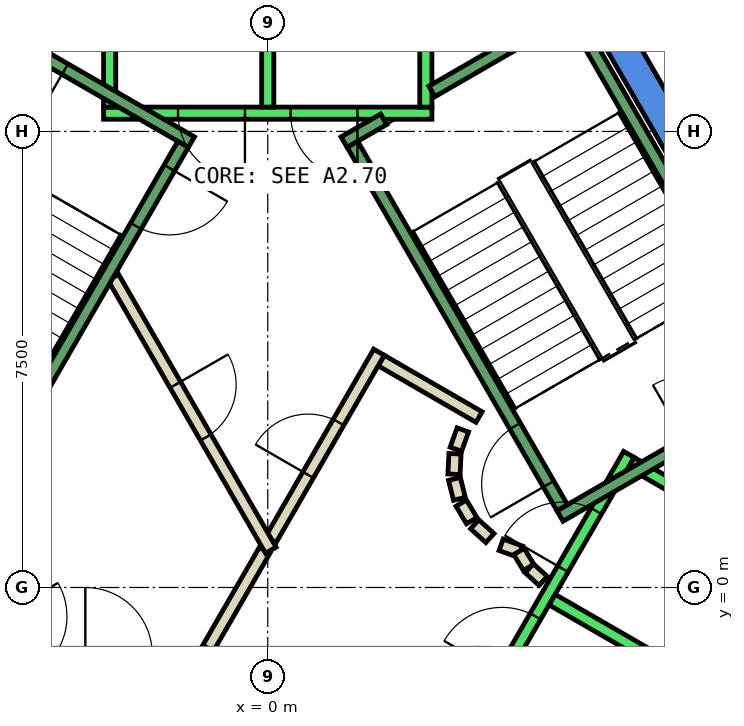
"""IFC4 building model, lengths in metres.
Left out: names, types, materials, properties, quantities, classifications, styles, units other than length and angle.
Written with IfcOpenShell. Run it as: python <this file> out.ifc"""

import sys

from ifc_helpers import new_model, si_unit, direction, frame, frame_2d, origin, place, context, subcontext, project, spatial, polyline, rectangle, outline, extrude, element, fill, save


model = new_model("IFC4")
c1 = context("Model", 3, precision=1e-05, world=origin(), true_north=direction((0.0, 1.0)))
c2 = subcontext(c1, "Body", "Model", "MODEL_VIEW")
j1 = project(units=[si_unit("LENGTHUNIT", "METRE"), si_unit("PLANEANGLEUNIT", "RADIAN")], contexts=[c1])
p1 = place(None, origin())
s1 = spatial("IfcSite", under=j1, at=p1, CompositionType="ELEMENT")
p2 = place(p1, origin())
s2 = spatial("IfcBuilding", under=s1, at=p2, CompositionType="ELEMENT")
p3 = place(p2, frame((0.0, 0.0, 331.4)))
s3 = spatial("IfcBuildingStorey", under=s2, at=p3, CompositionType="ELEMENT", Elevation=331.4)
p4 = place(p3, frame((0.0, 0.0, -0.45)))
e1 = element("IfcWall", 1, at=p4, inside=s3, PredefinedType="SHEAR", context=c2, shape_type="SweptSolid", body=[
    extrude(outline(polyline([(5.486, 9.998), (5.053, 9.748), (9.238, 2.5), (9.815, 2.5), (5.486, 9.998)])), origin(), (0.0, 0.0, 1.0), 4.6),
])
p5 = place(p3, frame((0.0, 0.0, -0.45)))
e2 = element("IfcWall", 2, at=p5, inside=s3, PredefinedType="SHEAR", context=c2, shape_type="SweptSolid", body=[
    extrude(outline(polyline([(4.907, -6.0), (9.815, 2.5), (9.238, 2.5), (4.619, -5.5), (4.907, -6.0)])), origin(), (0.0, 0.0, 1.0), 4.6),
])
p6 = place(p3, frame((-0.982, -1.0, 0.0), z_axis=(0.0, 0.0, 1.0), x_axis=(0.50024047865, 0.865886518847, 0.0)))
e3 = element("IfcWall", 3, at=p6, inside=s3, PredefinedType="PARTITIONING", context=c2, shape_type="SweptSolid", body=[
    extrude(rectangle(XDim=1.863, YDim=0.2, at=frame_2d((0.931, 0.0))), origin(), (0.0, 0.0, 1.0), 4.15),
])
p7 = place(p3, frame((1.866, 3.732, 0.0), z_axis=(0.0, 0.0, 1.0), x_axis=(0.866043361281, -0.499968895414, 0.0)))
e4 = element("IfcWall", 4, at=p7, inside=s3, PredefinedType="PARTITIONING", context=c2, shape_type="SweptSolid", body=[
    extrude(rectangle(XDim=1.858, YDim=0.2, at=frame_2d((0.929, 0.0))), origin(), (0.0, 0.0, 1.0), 4.15),
])
p8 = place(p3, frame((3.208, 2.592, 0.0), z_axis=(0.0, 0.0, 1.0), x_axis=(-0.337388820924, -0.941365382578, 0.0)))
e5 = element("IfcWall", 5, at=p8, inside=s3, PredefinedType="PARTITIONING", context=c2, shape_type="SweptSolid", body=[
    extrude(rectangle(XDim=0.338, YDim=0.2, at=frame_2d((0.169, 0.0))), origin(), (0.0, 0.0, 1.0), 4.15),
])
p9 = place(p3, frame((3.079, 2.199, 0.0), z_axis=(0.0, 0.0, 1.0), x_axis=(-0.047771483479, -0.998858290933, 0.0)))
e6 = element("IfcWall", 6, at=p9, inside=s3, PredefinedType="PARTITIONING", context=c2, shape_type="SweptSolid", body=[
    extrude(rectangle(XDim=0.337, YDim=0.2, at=frame_2d((0.169, 0.0))), origin(), (0.0, 0.0, 1.0), 4.15),
])
p10 = place(p3, frame((3.07, 1.786, 0.0), z_axis=(0.0, 0.0, 1.0), x_axis=(0.242705583207, -0.970099994784, 0.0)))
e7 = element("IfcWall", 7, at=p10, inside=s3, PredefinedType="PARTITIONING", context=c2, shape_type="SweptSolid", body=[
    extrude(rectangle(XDim=0.338, YDim=0.2, at=frame_2d((0.169, 0.0))), origin(), (0.0, 0.0, 1.0), 4.15),
])
for number, where, z_axis, x_axis in (
    (8, (3.182, 1.388, 0.0), (0.0, 0.0, 1.0), (0.512, -0.859, 0.0)),
    (9, (3.404, 1.039, 0.0), (0.0, 0.0, 1.0), (0.74, -0.672, 0.0)),
):
    element("IfcWall", number, at=place(p3, frame(where, z_axis=z_axis, x_axis=x_axis)), inside=s3, PredefinedType="PARTITIONING", context=c2, shape_type="SweptSolid", body=[
        extrude(rectangle(XDim=0.338, YDim=0.2, at=frame_2d((0.169, 0.0))), origin(), (0.0, 0.0, 1.0), 4.15),
    ])
p11 = place(p3, frame((3.838, 0.702, 0.0), z_axis=(0.0, 0.0, 1.0), x_axis=(0.941035081519, -0.338308993895, 0.0)))
e10 = element("IfcWall", 10, at=p11, inside=s3, PredefinedType="PARTITIONING", context=c2, shape_type="SweptSolid", body=[
    extrude(rectangle(XDim=0.337, YDim=0.2, at=frame_2d((0.168, 0.0))), origin(), (0.0, 0.0, 1.0), 4.15),
])
p12 = place(p3, frame((4.132, 0.593, 0.0), z_axis=(0.0, 0.0, 1.0), x_axis=(0.513561617048, -0.858052717201, 0.0)))
e11 = element("IfcWall", 11, at=p12, inside=s3, PredefinedType="PARTITIONING", context=c2, shape_type="SweptSolid", body=[
    extrude(rectangle(XDim=0.308, YDim=0.2, at=frame_2d((0.154, 0.0))), origin(), (0.0, 0.0, 1.0), 4.15),
])
p13 = place(p3, frame((4.301, 0.315, 0.0), z_axis=(0.0, 0.0, 1.0), x_axis=(0.741798017506, -0.670623367639, 0.0)))
e12 = element("IfcWall", 12, at=p13, inside=s3, PredefinedType="PARTITIONING", context=c2, shape_type="SweptSolid", body=[
    extrude(rectangle(XDim=0.309, YDim=0.2, at=frame_2d((0.154, 0.0))), origin(), (0.0, 0.0, 1.0), 4.15),
])
p14 = place(p3, frame((0.05, 0.787, 0.0), z_axis=(0.0, 0.0, 1.0), x_axis=(0.499954076797, 0.866051915934, 0.0)))
e13 = element("IfcWall", 13, at=p14, inside=s3, PredefinedType="PARTITIONING", context=c2, shape_type="SweptSolid", body=[
    extrude(rectangle(XDim=3.558, YDim=0.2, at=frame_2d((1.779, 0.0))), origin(), (0.0, 0.0, 1.0), 4.15),
])
p15 = place(p14, frame((1.229, 0.0, 0.0)))
e14 = element("IfcOpeningElement", 14, at=p15, cuts=e13, PredefinedType="OPENING", context=c2, shape_type="SweptSolid", body=[
    extrude(rectangle(XDim=1.0, YDim=2.1, at=frame_2d((0.5, 1.05))), frame((0.0, 0.11, 0.0), z_axis=(0.0, -1.0, 0.0), x_axis=(1.0, 0.0, 0.0)), (0.0, 0.0, 1.0), 0.22),
])
p16 = place(p3, frame((-2.54, 5.1, 0.0), z_axis=(0.0, 0.0, 1.0), x_axis=(0.499925051871, -0.866068670783, 0.0)))
e15 = element("IfcWall", 15, at=p16, inside=s3, PredefinedType="PARTITIONING", context=c2, shape_type="SweptSolid", body=[
    extrude(rectangle(XDim=5.181, YDim=0.2, at=frame_2d((2.59, 0.0))), origin(), (0.0, 0.0, 1.0), 4.15),
])
p17 = place(p16, frame((2.04, 0.0, 0.0)))
e16 = element("IfcOpeningElement", 16, at=p17, cuts=e15, PredefinedType="OPENING", context=c2, shape_type="SweptSolid", body=[
    extrude(rectangle(XDim=1.0, YDim=2.1, at=frame_2d((0.5, 1.05))), frame((0.0, 0.11, 0.0), z_axis=(0.0, -1.0, 0.0), x_axis=(1.0, 0.0, 0.0)), (0.0, 0.0, 1.0), 0.22),
])
p18 = place(p3, frame((5.532, 14.717, 0.0), z_axis=(0.0, 0.0, 1.0), x_axis=(0.499968011863, -0.866043871356, 0.0)))
e17 = element("IfcWall", 17, at=p18, inside=s3, PredefinedType="PARTITIONING", context=c2, shape_type="SweptSolid", body=[
    extrude(rectangle(XDim=7.201, YDim=0.2, at=frame_2d((3.6, 0.0))), origin(), (0.0, 0.0, 1.0), 4.15),
])
p19 = place(p18, frame((2.68, 0.0, 0.0)))
e18 = element("IfcOpeningElement", 18, at=p19, cuts=e17, PredefinedType="OPENING", context=c2, shape_type="SweptSolid", body=[
    extrude(rectangle(XDim=1.0, YDim=2.1, at=frame_2d((0.5, 1.05))), frame((0.0, 0.11, 0.0), z_axis=(0.0, -1.0, 0.0), x_axis=(1.0, 0.0, 0.0)), (0.0, 0.0, 1.0), 0.22),
])
p20 = place(p3, frame((2.7, 7.8, 0.0), z_axis=(0.0, 0.0, 1.0), x_axis=(-1.0, 0.0, 0.0)))
e19 = element("IfcWall", 19, at=p20, inside=s3, PredefinedType="STANDARD", context=c2, shape_type="SweptSolid", body=[
    extrude(rectangle(XDim=5.4, YDim=0.2, at=frame_2d((2.7, 0.0))), origin(), (0.0, 0.0, 1.0), 4.15),
])
p21 = place(p20, frame((1.225, 0.0, 0.0)))
e20 = element("IfcOpeningElement", 20, at=p21, cuts=e19, PredefinedType="OPENING", context=c2, shape_type="SweptSolid", body=[
    extrude(rectangle(XDim=1.1, YDim=2.1, at=frame_2d((0.55, 1.05))), frame((0.0, 0.11, 0.0), z_axis=(0.0, -1.0, 0.0), x_axis=(1.0, 0.0, 0.0)), (0.0, 0.0, 1.0), 0.22),
])
p22 = place(p20, frame((3.075, 0.0, 0.0)))
e21 = element("IfcOpeningElement", 21, at=p22, cuts=e19, PredefinedType="OPENING", context=c2, shape_type="SweptSolid", body=[
    extrude(rectangle(XDim=1.1, YDim=2.1, at=frame_2d((0.55, 1.05))), frame((0.0, 0.11, 0.0), z_axis=(0.0, -1.0, 0.0), x_axis=(1.0, 0.0, 0.0)), (0.0, 0.0, 1.0), 0.22),
])
for number, where, z_axis, x_axis in (
    (22, (2.6, 7.9, 0.0), (0.0, 0.0, 1.0), (0.0, 1.0, 0.0)),
    (23, (0.0, 7.9, 0.0), (0.0, 0.0, 1.0), (0.0, 1.0, 0.0)),
    (24, (-2.6, 7.9, 0.0), (0.0, 0.0, 1.0), (0.0, 1.0, 0.0)),
):
    element("IfcWall", number, at=place(p3, frame(where, z_axis=z_axis, x_axis=x_axis)), inside=s3, PredefinedType="STANDARD", context=c2, shape_type="SweptSolid", body=[
        extrude(rectangle(XDim=2.4, YDim=0.2, at=frame_2d((1.2, 0.0))), origin(), (0.0, 0.0, 1.0), 4.15),
    ])
p23 = place(p3, frame((-5.94, 2.188, 0.0), z_axis=(0.0, 0.0, 1.0), x_axis=(0.500034260056, -0.866005622828, 0.0)))
e25 = element("IfcWall", 25, at=p23, inside=s3, PredefinedType="STANDARD", context=c2, shape_type="SweptSolid", body=[
    extrude(rectangle(XDim=5.399, YDim=0.2, at=frame_2d((2.7, 0.0))), origin(), (0.0, 0.0, 1.0), 4.15),
])
p24 = place(p23, frame((3.075, 0.0, 0.0)))
e26 = element("IfcOpeningElement", 26, at=p24, cuts=e25, PredefinedType="OPENING", context=c2, shape_type="SweptSolid", body=[
    extrude(rectangle(XDim=1.1, YDim=2.1, at=frame_2d((0.55, 1.05))), frame((0.0, 0.11, 0.0), z_axis=(0.0, -1.0, 0.0), x_axis=(1.0, 0.0, 0.0)), (0.0, 0.0, 1.0), 0.22),
])
p25 = place(p23, frame((1.225, 0.0, 0.0)))
e27 = element("IfcOpeningElement", 27, at=p25, cuts=e25, PredefinedType="OPENING", context=c2, shape_type="SweptSolid", body=[
    extrude(rectangle(XDim=1.1, YDim=2.1, at=frame_2d((0.55, 1.05))), frame((0.0, 0.11, 0.0), z_axis=(0.0, -1.0, 0.0), x_axis=(1.0, 0.0, 0.0)), (0.0, 0.0, 1.0), 0.22),
])
p26 = place(p3, frame((3.24, -2.488, 0.0), z_axis=(0.0, 0.0, 1.0), x_axis=(0.500034260056, 0.866005622828, 0.0)))
e28 = element("IfcWall", 28, at=p26, inside=s3, PredefinedType="STANDARD", context=c2, shape_type="SweptSolid", body=[
    extrude(rectangle(XDim=5.399, YDim=0.2, at=frame_2d((2.7, 0.0))), origin(), (0.0, 0.0, 1.0), 4.15),
])
p27 = place(p26, frame((3.225, 0.0, 0.0)))
e29 = element("IfcOpeningElement", 29, at=p27, cuts=e28, PredefinedType="OPENING", context=c2, shape_type="SweptSolid", body=[
    extrude(rectangle(XDim=1.1, YDim=2.1, at=frame_2d((0.55, 1.05))), frame((0.0, 0.11, 0.0), z_axis=(0.0, -1.0, 0.0), x_axis=(1.0, 0.0, 0.0)), (0.0, 0.0, 1.0), 0.22),
])
p28 = place(p26, frame((1.225, 0.0, 0.0)))
e30 = element("IfcOpeningElement", 30, at=p28, cuts=e28, PredefinedType="OPENING", context=c2, shape_type="SweptSolid", body=[
    extrude(rectangle(XDim=1.1, YDim=2.1, at=frame_2d((0.55, 1.05))), frame((0.0, 0.11, 0.0), z_axis=(0.0, -1.0, 0.0), x_axis=(1.0, 0.0, 0.0)), (0.0, 0.0, 1.0), 0.22),
])
p29 = place(p3, frame((5.492, -3.788, 0.0), z_axis=(0.0, 0.0, 1.0), x_axis=(0.500034260056, 0.866005622828, 0.0)))
e31 = element("IfcWall", 31, at=p29, inside=s3, PredefinedType="STANDARD", context=c2, shape_type="SweptSolid", body=[
    extrude(rectangle(XDim=5.399, YDim=0.2, at=frame_2d((2.7, 0.0))), origin(), (0.0, 0.0, 1.0), 4.15),
])
for number, where, z_axis, x_axis in (
    (32, (4.677, -0.2, 0.0), (0.0, 0.0, 1.0), (0.866, -0.5, 0.0)),
    (33, (5.977, 2.052, 0.0), (0.0, 0.0, 1.0), (0.866, -0.5, 0.0)),
):
    element("IfcWall", number, at=place(p3, frame(where, z_axis=z_axis, x_axis=x_axis)), inside=s3, PredefinedType="STANDARD", context=c2, shape_type="SweptSolid", body=[
        extrude(rectangle(XDim=2.399, YDim=0.2, at=frame_2d((1.2, 0.0))), origin(), (0.0, 0.0, 1.0), 4.15),
    ])
p30 = place(p3, frame((4.806, 1.176, 0.0), z_axis=(0.0, 0.0, 1.0), x_axis=(0.866059941101, 0.499940174841, 0.0)))
e34 = element("IfcWall", 34, at=p30, inside=s3, PredefinedType="STANDARD", context=c2, shape_type="SweptSolid", body=[
    extrude(rectangle(XDim=4.4, YDim=0.2, at=frame_2d((2.2, 0.0))), origin(), (0.0, 0.0, 1.0), 4.15),
])
p31 = place(p30, frame((2.4, 0.0, 0.0)))
e35 = element("IfcOpeningElement", 35, at=p31, cuts=e34, PredefinedType="OPENING", context=c2, shape_type="SweptSolid", body=[
    extrude(rectangle(XDim=1.1, YDim=2.2, at=frame_2d((0.55, 1.1))), frame((0.0, 0.11, 0.0), z_axis=(0.0, -1.0, 0.0), x_axis=(1.0, 0.0, 0.0)), (0.0, 0.0, 1.0), 0.22),
])
p32 = place(p3, frame((2.7, 8.158, 0.0), z_axis=(0.0, 0.0, 1.0), x_axis=(0.86611865017, 0.499838457731, 0.0)))
e36 = element("IfcWall", 36, at=p32, inside=s3, PredefinedType="STANDARD", context=c2, shape_type="SweptSolid", body=[
    extrude(rectangle(XDim=2.733, YDim=0.2, at=frame_2d((1.366, 0.0))), origin(), (0.0, 0.0, 1.0), 4.15),
])
p33 = place(p3, frame((1.256, 7.324, 0.0), z_axis=(0.0, 0.0, 1.0), x_axis=(0.865915093549, 0.500191014278, 0.0)))
e37 = element("IfcWall", 37, at=p33, inside=s3, PredefinedType="STANDARD", context=c2, shape_type="SweptSolid", body=[
    extrude(rectangle(XDim=0.752, YDim=0.2, at=frame_2d((0.376, 0.0))), origin(), (0.0, 0.0, 1.0), 4.15),
])
p34 = place(p3, frame((4.843, 1.312, 0.0), z_axis=(0.0, 0.0, 1.0), x_axis=(-0.499963383562, 0.866046543262, 0.0)))
e38 = element("IfcWall", 38, at=p34, inside=s3, PredefinedType="STANDARD", context=c2, shape_type="SweptSolid", body=[
    extrude(rectangle(XDim=6.9, YDim=0.2, at=frame_2d((3.45, 0.0))), origin(), (0.0, 0.0, 1.0), 4.15),
])
p35 = place(p34, frame((0.45, 0.0, 0.0)))
e39 = element("IfcOpeningElement", 39, at=p35, cuts=e38, PredefinedType="OPENING", context=c2, shape_type="SweptSolid", body=[
    extrude(rectangle(XDim=1.1, YDim=2.2, at=frame_2d((0.55, 1.1))), frame((0.0, 0.11, 0.0), z_axis=(0.0, -1.0, 0.0), x_axis=(1.0, 0.0, 0.0)), (0.0, 0.0, 1.0), 0.22),
])
p36 = place(p3, frame((8.48, 3.412, 0.0), z_axis=(0.0, 0.0, 1.0), x_axis=(-0.499978703459, 0.866037698999, 0.0)))
e40 = element("IfcWall", 40, at=p36, inside=s3, PredefinedType="STANDARD", context=c2, shape_type="SweptSolid", body=[
    extrude(rectangle(XDim=6.9, YDim=0.2, at=frame_2d((3.45, 0.0))), origin(), (0.0, 0.0, 1.0), 4.15),
])
p37 = place(p3, frame((-1.256, 7.324, 0.0), z_axis=(0.0, 0.0, 1.0), x_axis=(-0.866046073146, 0.499964197906, 0.0)))
e41 = element("IfcWall", 41, at=p37, inside=s3, PredefinedType="STANDARD", context=c2, shape_type="SweptSolid", body=[
    extrude(rectangle(XDim=4.4, YDim=0.2, at=frame_2d((2.2, 0.0))), origin(), (0.0, 0.0, 1.0), 4.15),
])
p38 = place(p37, frame((2.4, 0.0, 0.0)))
e42 = element("IfcOpeningElement", 42, at=p38, cuts=e41, PredefinedType="OPENING", context=c2, shape_type="SweptSolid", body=[
    extrude(rectangle(XDim=1.1, YDim=2.2, at=frame_2d((0.55, 1.1))), frame((0.0, 0.11, 0.0), z_axis=(0.0, -1.0, 0.0), x_axis=(1.0, 0.0, 0.0)), (0.0, 0.0, 1.0), 0.22),
])
p39 = place(p3, frame((-1.393, 7.288, 0.0), z_axis=(0.0, 0.0, 1.0), x_axis=(-0.499963383562, -0.866046543262, 0.0)))
e43 = element("IfcWall", 43, at=p39, inside=s3, PredefinedType="STANDARD", context=c2, shape_type="SweptSolid", body=[
    extrude(rectangle(XDim=6.9, YDim=0.2, at=frame_2d((3.45, 0.0))), origin(), (0.0, 0.0, 1.0), 4.15),
])
p40 = place(p39, frame((0.45, 0.0, 0.0)))
e44 = element("IfcOpeningElement", 44, at=p40, cuts=e43, PredefinedType="OPENING", context=c2, shape_type="SweptSolid", body=[
    extrude(rectangle(XDim=1.1, YDim=2.2, at=frame_2d((0.55, 1.1))), frame((0.0, 0.11, 0.0), z_axis=(0.0, -1.0, 0.0), x_axis=(1.0, 0.0, 0.0)), (0.0, 0.0, 1.0), 0.22),
])
p41 = place(p15, origin())
e45 = element("IfcDoor", 45, at=p41, inside=s3, OperationType="SINGLE_SWING_RIGHT", PredefinedType="DOOR", context=c2, shape_type="SweptSolid", body=[
    extrude(rectangle(XDim=1.0, YDim=2.1, at=frame_2d((0.5, 1.05))), frame((0.0, 0.025, 0.0), z_axis=(0.0, -1.0, 0.0), x_axis=(1.0, 0.0, 0.0)), (0.0, 0.0, 1.0), 0.05),
])
fill(e14, e45)
p42 = place(p17, origin())
e46 = element("IfcDoor", 46, at=p42, inside=s3, OperationType="SINGLE_SWING_RIGHT", PredefinedType="DOOR", context=c2, shape_type="SweptSolid", body=[
    extrude(rectangle(XDim=1.0, YDim=2.1, at=frame_2d((0.5, 1.05))), frame((0.0, 0.025, 0.0), z_axis=(0.0, -1.0, 0.0), x_axis=(1.0, 0.0, 0.0)), (0.0, 0.0, 1.0), 0.05),
])
fill(e16, e46)
p43 = place(p21, origin())
e47 = element("IfcDoor", 47, at=p43, inside=s3, OperationType="SLIDING_TO_LEFT", PredefinedType="DOOR", context=c2, shape_type="SweptSolid", body=[
    extrude(rectangle(XDim=1.1, YDim=2.1, at=frame_2d((0.55, 1.05))), frame((0.0, 0.025, 0.0), z_axis=(0.0, -1.0, 0.0), x_axis=(1.0, 0.0, 0.0)), (0.0, 0.0, 1.0), 0.05),
])
fill(e20, e47)
p44 = place(p22, origin())
e48 = element("IfcDoor", 48, at=p44, inside=s3, OperationType="SLIDING_TO_LEFT", PredefinedType="DOOR", context=c2, shape_type="SweptSolid", body=[
    extrude(rectangle(XDim=1.1, YDim=2.1, at=frame_2d((0.55, 1.05))), frame((0.0, 0.025, 0.0), z_axis=(0.0, -1.0, 0.0), x_axis=(1.0, 0.0, 0.0)), (0.0, 0.0, 1.0), 0.05),
])
fill(e21, e48)
p45 = place(p27, origin())
e49 = element("IfcDoor", 49, at=p45, inside=s3, OperationType="SLIDING_TO_LEFT", PredefinedType="DOOR", context=c2, shape_type="SweptSolid", body=[
    extrude(rectangle(XDim=1.1, YDim=2.1, at=frame_2d((0.55, 1.05))), frame((0.0, 0.025, 0.0), z_axis=(0.0, -1.0, 0.0), x_axis=(1.0, 0.0, 0.0)), (0.0, 0.0, 1.0), 0.05),
])
fill(e29, e49)
p46 = place(p28, origin())
e50 = element("IfcDoor", 50, at=p46, inside=s3, OperationType="SLIDING_TO_LEFT", PredefinedType="DOOR", context=c2, shape_type="SweptSolid", body=[
    extrude(rectangle(XDim=1.1, YDim=2.1, at=frame_2d((0.55, 1.05))), frame((0.0, 0.025, 0.0), z_axis=(0.0, -1.0, 0.0), x_axis=(1.0, 0.0, 0.0)), (0.0, 0.0, 1.0), 0.05),
])
fill(e30, e50)
p47 = place(p35, origin())
e51 = element("IfcDoor", 51, at=p47, inside=s3, OperationType="SINGLE_SWING_LEFT", PredefinedType="DOOR", context=c2, shape_type="SweptSolid", body=[
    extrude(rectangle(XDim=1.1, YDim=2.2, at=frame_2d((0.55, 1.1))), frame((0.0, 0.025, 0.0), z_axis=(0.0, -1.0, 0.0), x_axis=(1.0, 0.0, 0.0)), (0.0, 0.0, 1.0), 0.05),
])
fill(e39, e51)
p48 = place(p40, origin())
e52 = element("IfcDoor", 52, at=p48, inside=s3, OperationType="SINGLE_SWING_LEFT", PredefinedType="DOOR", context=c2, shape_type="SweptSolid", body=[
    extrude(rectangle(XDim=1.1, YDim=2.2, at=frame_2d((0.55, 1.1))), frame((0.0, 0.025, 0.0), z_axis=(0.0, -1.0, 0.0), x_axis=(1.0, 0.0, 0.0)), (0.0, 0.0, 1.0), 0.05),
])
fill(e44, e52)
p49 = place(p38, origin())
e53 = element("IfcDoor", 53, at=p49, inside=s3, OperationType="SINGLE_SWING_LEFT", PredefinedType="DOOR", context=c2, shape_type="SweptSolid", body=[
    extrude(rectangle(XDim=1.1, YDim=2.2, at=frame_2d((0.55, 1.1))), frame((0.0, 0.025, 0.0), z_axis=(0.0, -1.0, 0.0), x_axis=(1.0, 0.0, 0.0)), (0.0, 0.0, 1.0), 0.05),
])
fill(e42, e53)
save(model, sys.argv[1])
